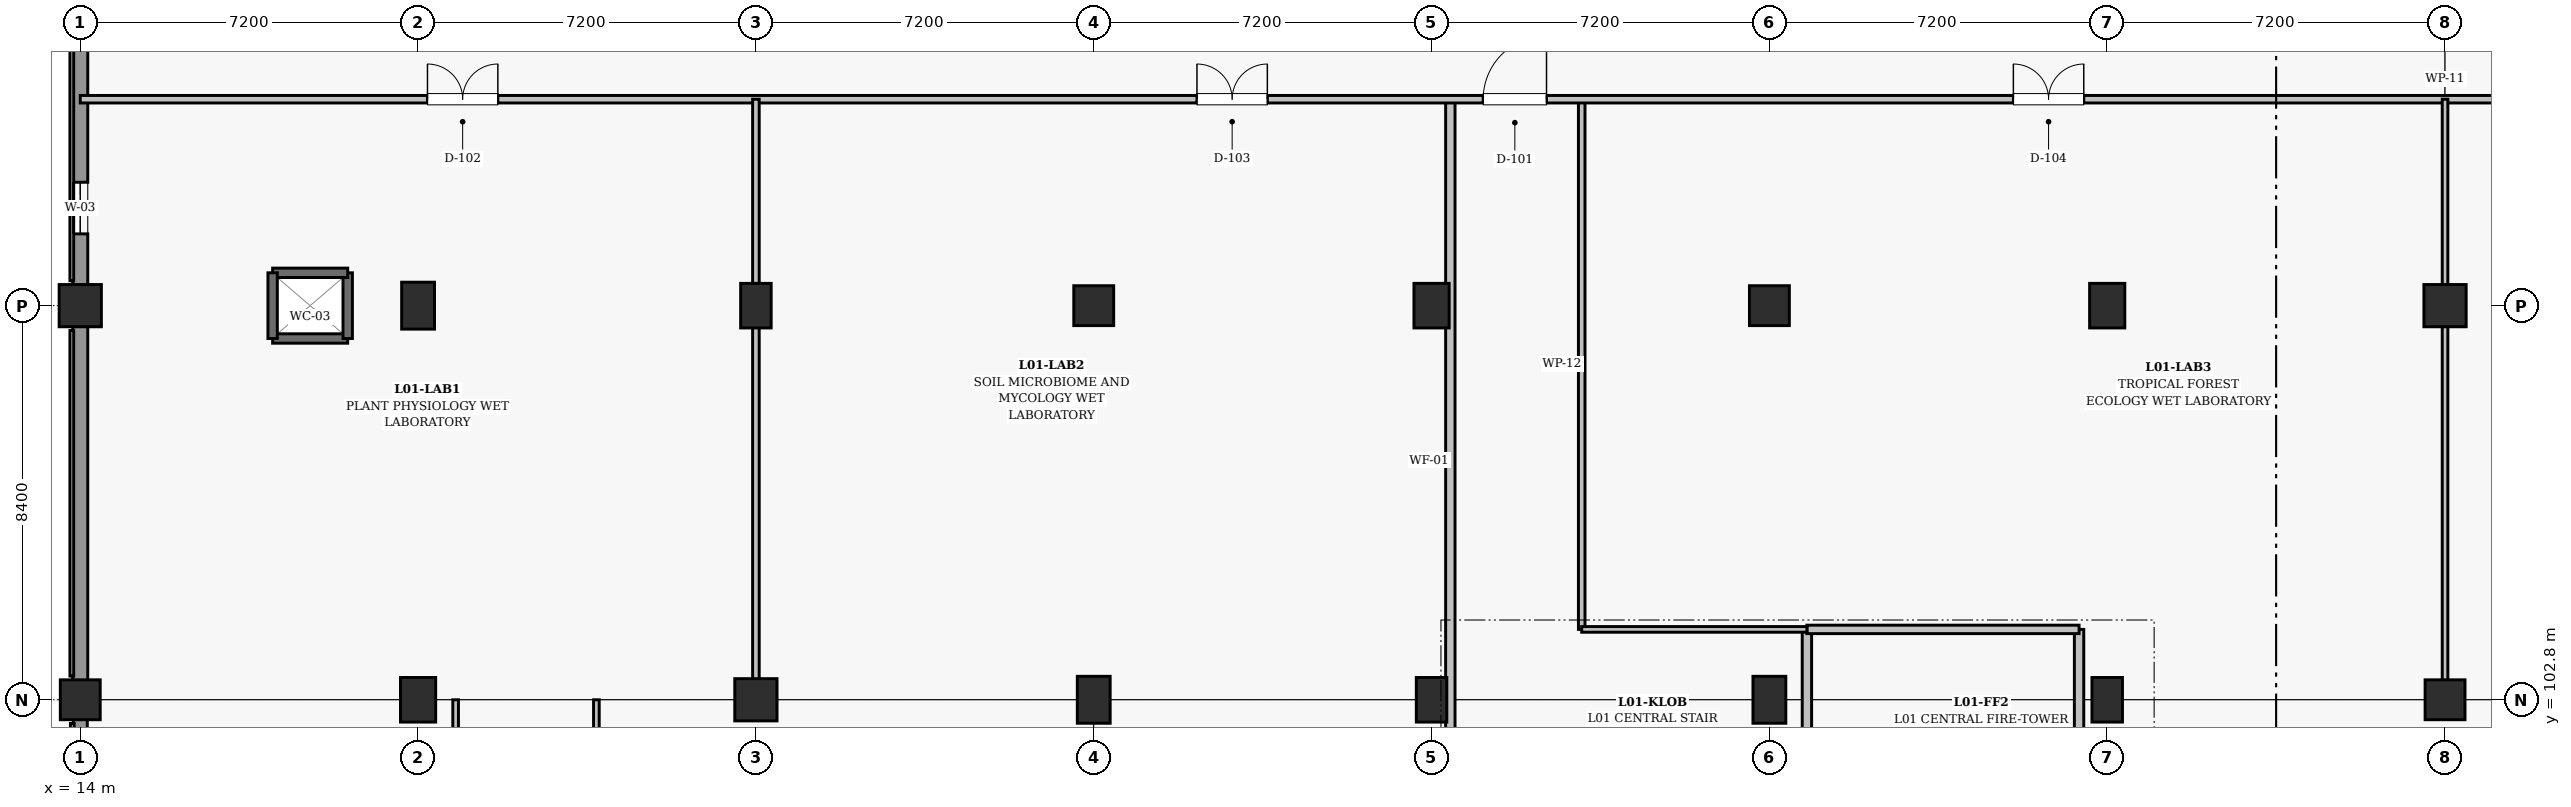
"""IFC4 building model, lengths in metres.
Left out: names, types, materials, properties, quantities, classifications, styles, units other than length and angle.
Written with IfcOpenShell. Run it as: python <this file> out.ifc"""

import sys

from ifc_helpers import new_model, si_unit, direction, frame, frame_2d, origin, origin_2d, place, context, subcontext, project, spatial, rectangle, extrude, element, fill, save


model = new_model("IFC4")
c1 = context("Model", 3, precision=1e-05, world=origin(), true_north=direction((0.0, 1.0)))
c2 = subcontext(c1, "Body", "Model", "MODEL_VIEW")
j1 = project(units=[si_unit("LENGTHUNIT", "METRE"), si_unit("PLANEANGLEUNIT", "RADIAN")], contexts=[c1])
p1 = place(None, origin())
s1 = spatial("IfcSite", under=j1, at=p1, CompositionType="ELEMENT")
p2 = place(p1, origin())
s2 = spatial("IfcBuilding", under=s1, at=p2, CompositionType="ELEMENT")
p3 = place(p2, frame((0.0, 0.0, 5.4)))
s3 = spatial("IfcBuildingStorey", under=s2, at=p3, CompositionType="ELEMENT", Elevation=5.4)
p4 = place(p3, frame((14.0, 102.8, 0.0), z_axis=(0.0, 0.0, 1.0), x_axis=(1.0, 0.0, 0.0)))
e1 = element("IfcColumn", 1, at=p4, inside=s3, PredefinedType="COLUMN", context=c2, shape_type="SweptSolid", body=[
    extrude(rectangle(XDim=0.85, YDim=0.85, at=origin_2d()), origin(), (0.0, 0.0, 1.0), 4.5),
])
p5 = place(p3, frame((14.0, 111.2, 0.0), z_axis=(0.0, 0.0, 1.0), x_axis=(1.0, 0.0, 0.0)))
e2 = element("IfcColumn", 2, at=p5, inside=s3, PredefinedType="COLUMN", context=c2, shape_type="SweptSolid", body=[
    extrude(rectangle(XDim=0.9, YDim=0.9, at=origin_2d()), origin(), (0.0, 0.0, 1.0), 4.5),
])
p6 = place(p3, frame((21.2, 102.8, 0.0), z_axis=(0.0, 0.0, 1.0), x_axis=(1.0, 0.0, 0.0)))
e3 = element("IfcColumn", 3, at=p6, inside=s3, PredefinedType="COLUMN", context=c2, shape_type="SweptSolid", body=[
    extrude(rectangle(XDim=0.75, YDim=0.95, at=origin_2d()), origin(), (0.0, 0.0, 1.0), 4.5),
])
p7 = place(p3, frame((21.2, 111.2, 0.0), z_axis=(0.0, 0.0, 1.0), x_axis=(1.0, 0.0, 0.0)))
e4 = element("IfcColumn", 4, at=p7, inside=s3, PredefinedType="COLUMN", context=c2, shape_type="SweptSolid", body=[
    extrude(rectangle(XDim=0.7, YDim=1.0, at=origin_2d()), origin(), (0.0, 0.0, 1.0), 4.5),
])
p8 = place(p3, frame((28.4, 102.8, 0.0), z_axis=(0.0, 0.0, 1.0), x_axis=(1.0, 0.0, 0.0)))
e5 = element("IfcColumn", 5, at=p8, inside=s3, PredefinedType="COLUMN", context=c2, shape_type="SweptSolid", body=[
    extrude(rectangle(XDim=0.9, YDim=0.9, at=origin_2d()), origin(), (0.0, 0.0, 1.0), 4.5),
])
p9 = place(p3, frame((28.4, 111.2, 0.0), z_axis=(0.0, 0.0, 1.0), x_axis=(1.0, 0.0, 0.0)))
e6 = element("IfcColumn", 6, at=p9, inside=s3, PredefinedType="COLUMN", context=c2, shape_type="SweptSolid", body=[
    extrude(rectangle(XDim=0.65, YDim=0.95, at=origin_2d()), origin(), (0.0, 0.0, 1.0), 4.5),
])
p10 = place(p3, frame((35.6, 102.8, 0.0), z_axis=(0.0, 0.0, 1.0), x_axis=(1.0, 0.0, 0.0)))
e7 = element("IfcColumn", 7, at=p10, inside=s3, PredefinedType="COLUMN", context=c2, shape_type="SweptSolid", body=[
    extrude(rectangle(XDim=0.7, YDim=1.0, at=origin_2d()), origin(), (0.0, 0.0, 1.0), 4.5),
])
p11 = place(p3, frame((35.6, 111.2, 0.0), z_axis=(0.0, 0.0, 1.0), x_axis=(1.0, 0.0, 0.0)))
e8 = element("IfcColumn", 8, at=p11, inside=s3, PredefinedType="COLUMN", context=c2, shape_type="SweptSolid", body=[
    extrude(rectangle(XDim=0.85, YDim=0.85, at=origin_2d()), origin(), (0.0, 0.0, 1.0), 4.5),
])
p12 = place(p3, frame((42.8, 102.8, 0.0), z_axis=(0.0, 0.0, 1.0), x_axis=(1.0, 0.0, 0.0)))
e9 = element("IfcColumn", 9, at=p12, inside=s3, PredefinedType="COLUMN", context=c2, shape_type="SweptSolid", body=[
    extrude(rectangle(XDim=0.65, YDim=0.95, at=origin_2d()), origin(), (0.0, 0.0, 1.0), 4.5),
])
p13 = place(p3, frame((42.8, 111.2, 0.0), z_axis=(0.0, 0.0, 1.0), x_axis=(1.0, 0.0, 0.0)))
e10 = element("IfcColumn", 10, at=p13, inside=s3, PredefinedType="COLUMN", context=c2, shape_type="SweptSolid", body=[
    extrude(rectangle(XDim=0.75, YDim=0.95, at=origin_2d()), origin(), (0.0, 0.0, 1.0), 4.5),
])
p14 = place(p3, frame((50.0, 102.8, 0.0), z_axis=(0.0, 0.0, 1.0), x_axis=(1.0, 0.0, 0.0)))
e11 = element("IfcColumn", 11, at=p14, inside=s3, PredefinedType="COLUMN", context=c2, shape_type="SweptSolid", body=[
    extrude(rectangle(XDim=0.7, YDim=1.0, at=origin_2d()), origin(), (0.0, 0.0, 1.0), 4.5),
])
p15 = place(p3, frame((50.0, 111.2, 0.0), z_axis=(0.0, 0.0, 1.0), x_axis=(1.0, 0.0, 0.0)))
e12 = element("IfcColumn", 12, at=p15, inside=s3, PredefinedType="COLUMN", context=c2, shape_type="SweptSolid", body=[
    extrude(rectangle(XDim=0.85, YDim=0.85, at=origin_2d()), origin(), (0.0, 0.0, 1.0), 4.5),
])
p16 = place(p3, frame((57.2, 102.8, 0.0), z_axis=(0.0, 0.0, 1.0), x_axis=(1.0, 0.0, 0.0)))
e13 = element("IfcColumn", 13, at=p16, inside=s3, PredefinedType="COLUMN", context=c2, shape_type="SweptSolid", body=[
    extrude(rectangle(XDim=0.65, YDim=0.95, at=origin_2d()), origin(), (0.0, 0.0, 1.0), 4.5),
])
p17 = place(p3, frame((57.2, 111.2, 0.0), z_axis=(0.0, 0.0, 1.0), x_axis=(1.0, 0.0, 0.0)))
e14 = element("IfcColumn", 14, at=p17, inside=s3, PredefinedType="COLUMN", context=c2, shape_type="SweptSolid", body=[
    extrude(rectangle(XDim=0.75, YDim=0.95, at=origin_2d()), origin(), (0.0, 0.0, 1.0), 4.5),
])
p18 = place(p3, frame((64.4, 102.8, 0.0), z_axis=(0.0, 0.0, 1.0), x_axis=(1.0, 0.0, 0.0)))
e15 = element("IfcColumn", 15, at=p18, inside=s3, PredefinedType="COLUMN", context=c2, shape_type="SweptSolid", body=[
    extrude(rectangle(XDim=0.85, YDim=0.85, at=origin_2d()), origin(), (0.0, 0.0, 1.0), 4.5),
])
p19 = place(p3, frame((64.4, 111.2, 0.0), z_axis=(0.0, 0.0, 1.0), x_axis=(1.0, 0.0, 0.0)))
e16 = element("IfcColumn", 16, at=p19, inside=s3, PredefinedType="COLUMN", context=c2, shape_type="SweptSolid", body=[
    extrude(rectangle(XDim=0.9, YDim=0.9, at=origin_2d()), origin(), (0.0, 0.0, 1.0), 4.5),
])
p20 = place(p3, frame((14.0, 103.205, 0.0), z_axis=(0.0, 0.0, 1.0), x_axis=(0.0, 1.0, 0.0)))
e17 = element("IfcWall", 17, at=p20, inside=s3, PredefinedType="SOLIDWALL", context=c2, shape_type="SweptSolid", body=[
    extrude(rectangle(XDim=7.565, YDim=0.32, at=frame_2d((3.782, 0.0))), origin(), (0.0, 0.0, 1.0), 3.555),
])
p21 = place(p3, frame((14.0, 111.63, 0.0), z_axis=(0.0, 0.0, 1.0), x_axis=(0.0, 1.0, 0.0)))
e18 = element("IfcWall", 18, at=p21, inside=s3, PredefinedType="SOLIDWALL", context=c2, shape_type="SweptSolid", body=[
    extrude(rectangle(XDim=7.515, YDim=0.32, at=frame_2d((3.758, 0.0))), origin(), (0.0, 0.0, 1.0), 3.555),
])
p22 = place(p21, frame((1.1, 0.0, 0.95)))
e19 = element("IfcOpeningElement", 19, at=p22, cuts=e18, PredefinedType="OPENING", context=c2, shape_type="SweptSolid", body=[
    extrude(rectangle(XDim=1.1, YDim=2.3, at=frame_2d((0.55, 1.15))), frame((0.0, 0.17, 0.0), z_axis=(0.0, -1.0, 0.0), x_axis=(1.0, 0.0, 0.0)), (0.0, 0.0, 1.0), 0.34),
])
p23 = place(p3, frame((14.0, 94.78, 0.0), z_axis=(0.0, 0.0, 1.0), x_axis=(0.0, 1.0, 0.0)))
e20 = element("IfcWall", 20, at=p23, inside=s3, PredefinedType="SOLIDWALL", context=c2, shape_type="SweptSolid", body=[
    extrude(rectangle(XDim=7.615, YDim=0.3, at=frame_2d((3.808, 0.0))), origin(), (0.0, 0.0, 1.0), 3.575),
])
p24 = place(p3, frame((18.1, 110.5, 0.0), z_axis=(0.0, 0.0, 1.0), x_axis=(1.0, 0.0, 0.0)))
e21 = element("IfcWall", 21, at=p24, inside=s3, PredefinedType="SHEAR", context=c2, shape_type="SweptSolid", body=[
    extrude(rectangle(XDim=1.6, YDim=0.2, at=frame_2d((0.8, 0.0))), origin(), (0.0, 0.0, 1.0), 4.14),
])
p25 = place(p3, frame((19.7, 110.5, 0.0), z_axis=(0.0, 0.0, 1.0), x_axis=(0.0, 1.0, 0.0)))
e22 = element("IfcWall", 22, at=p25, inside=s3, PredefinedType="SHEAR", context=c2, shape_type="SweptSolid", body=[
    extrude(rectangle(XDim=1.4, YDim=0.2, at=frame_2d((0.7, 0.0))), origin(), (0.0, 0.0, 1.0), 4.14),
])
p26 = place(p3, frame((19.7, 111.9, 0.0), z_axis=(0.0, 0.0, 1.0), x_axis=(-1.0, 0.0, 0.0)))
e23 = element("IfcWall", 23, at=p26, inside=s3, PredefinedType="SHEAR", context=c2, shape_type="SweptSolid", body=[
    extrude(rectangle(XDim=1.6, YDim=0.2, at=frame_2d((0.8, 0.0))), origin(), (0.0, 0.0, 1.0), 4.14),
])
p27 = place(p3, frame((18.1, 111.9, 0.0), z_axis=(0.0, 0.0, 1.0), x_axis=(0.0, -1.0, 0.0)))
e24 = element("IfcWall", 24, at=p27, inside=s3, PredefinedType="SHEAR", context=c2, shape_type="SweptSolid", body=[
    extrude(rectangle(XDim=1.4, YDim=0.2, at=frame_2d((0.7, 0.0))), origin(), (0.0, 0.0, 1.0), 4.14),
])
p28 = place(p3, frame((50.8, 99.1, 0.0), z_axis=(0.0, 0.0, 1.0), x_axis=(0.0, 1.0, 0.0)))
e25 = element("IfcWall", 25, at=p28, inside=s3, PredefinedType="SOLIDWALL", context=c2, shape_type="SweptSolid", body=[
    extrude(rectangle(XDim=5.2, YDim=0.2, at=frame_2d((2.6, 0.0))), origin(), (0.0, 0.0, 1.0), 3.36),
])
p29 = place(p28, frame((1.55, 0.0, 0.0)))
e26 = element("IfcOpeningElement", 26, at=p29, cuts=e25, PredefinedType="OPENING", context=c2, shape_type="SweptSolid", body=[
    extrude(rectangle(XDim=1.1, YDim=2.15, at=frame_2d((0.55, 1.075))), frame((0.0, 0.11, 0.0), z_axis=(0.0, -1.0, 0.0), x_axis=(1.0, 0.0, 0.0)), (0.0, 0.0, 1.0), 0.22),
])
p30 = place(p3, frame((56.6, 99.1, 0.0), z_axis=(0.0, 0.0, 1.0), x_axis=(0.0, 1.0, 0.0)))
e27 = element("IfcWall", 27, at=p30, inside=s3, PredefinedType="SOLIDWALL", context=c2, shape_type="SweptSolid", body=[
    extrude(rectangle(XDim=5.2, YDim=0.2, at=frame_2d((2.6, 0.0))), origin(), (0.0, 0.0, 1.0), 3.36),
])
p31 = place(p3, frame((50.8, 104.3, 0.0), z_axis=(0.0, 0.0, 1.0), x_axis=(1.0, 0.0, 0.0)))
e28 = element("IfcWall", 28, at=p31, inside=s3, PredefinedType="SOLIDWALL", context=c2, shape_type="SweptSolid", body=[
    extrude(rectangle(XDim=5.8, YDim=0.18, at=frame_2d((2.9, 0.0))), origin(), (0.0, 0.0, 1.0), 3.56),
])
p32 = place(p3, frame((43.2, 100.2, 0.0), z_axis=(0.0, 0.0, 1.0), x_axis=(0.0, 1.0, 0.0)))
e29 = element("IfcWall", 29, at=p32, inside=s3, PredefinedType="SOLIDWALL", context=c2, shape_type="SweptSolid", body=[
    extrude(rectangle(XDim=15.4, YDim=0.2, at=frame_2d((7.7, 0.0))), origin(), (0.0, 0.0, 1.0), 2.96),
])
p33 = place(p32, frame((0.45, 0.0, 0.0)))
e30 = element("IfcOpeningElement", 30, at=p33, cuts=e29, PredefinedType="OPENING", context=c2, shape_type="SweptSolid", body=[
    extrude(rectangle(XDim=1.1, YDim=2.15, at=frame_2d((0.55, 1.075))), frame((0.0, 0.11, 0.0), z_axis=(0.0, -1.0, 0.0), x_axis=(1.0, 0.0, 0.0)), (0.0, 0.0, 1.0), 0.22),
])
p34 = place(p3, frame((46.0, 104.3, 0.0), z_axis=(0.0, 0.0, 1.0), x_axis=(0.0, 1.0, 0.0)))
e31 = element("IfcWall", 31, at=p34, inside=s3, PredefinedType="PARTITIONING", context=c2, shape_type="SweptSolid", body=[
    extrude(rectangle(XDim=11.3, YDim=0.14, at=frame_2d((5.65, 0.0))), origin(), (0.0, 0.0, 1.0), 3.52),
])
p35 = place(p3, frame((46.0, 104.3, 0.0), z_axis=(0.0, 0.0, 1.0), x_axis=(1.0, 0.0, 0.0)))
e32 = element("IfcWall", 32, at=p35, inside=s3, PredefinedType="PARTITIONING", context=c2, shape_type="SweptSolid", body=[
    extrude(rectangle(XDim=4.8, YDim=0.12, at=frame_2d((2.4, 0.0))), origin(), (0.0, 0.0, 1.0), 3.31),
])
p36 = place(p3, frame((14.0, 115.6, 0.0), z_axis=(0.0, 0.0, 1.0), x_axis=(1.0, 0.0, 0.0)))
e33 = element("IfcWall", 33, at=p36, inside=s3, PredefinedType="PARTITIONING", context=c2, shape_type="SweptSolid", body=[
    extrude(rectangle(XDim=100.8, YDim=0.16, at=frame_2d((50.4, 0.0))), origin(), (0.0, 0.0, 1.0), 2.96),
])
p37 = place(p36, frame((29.9, 0.0, 0.0)))
e34 = element("IfcOpeningElement", 34, at=p37, cuts=e33, PredefinedType="OPENING", context=c2, shape_type="SweptSolid", body=[
    extrude(rectangle(XDim=1.35, YDim=2.2, at=frame_2d((0.675, 1.1))), frame((0.0, 0.09, 0.0), z_axis=(0.0, -1.0, 0.0), x_axis=(1.0, 0.0, 0.0)), (0.0, 0.0, 1.0), 0.18),
])
p38 = place(p36, frame((7.4, 0.0, 0.0)))
e35 = element("IfcOpeningElement", 35, at=p38, cuts=e33, PredefinedType="OPENING", context=c2, shape_type="SweptSolid", body=[
    extrude(rectangle(XDim=1.5, YDim=2.25, at=frame_2d((0.75, 1.125))), frame((0.0, 0.09, 0.0), z_axis=(0.0, -1.0, 0.0), x_axis=(1.0, 0.0, 0.0)), (0.0, 0.0, 1.0), 0.18),
])
p39 = place(p36, frame((23.8, 0.0, 0.0)))
e36 = element("IfcOpeningElement", 36, at=p39, cuts=e33, PredefinedType="OPENING", context=c2, shape_type="SweptSolid", body=[
    extrude(rectangle(XDim=1.5, YDim=2.25, at=frame_2d((0.75, 1.125))), frame((0.0, 0.09, 0.0), z_axis=(0.0, -1.0, 0.0), x_axis=(1.0, 0.0, 0.0)), (0.0, 0.0, 1.0), 0.18),
])
p40 = place(p36, frame((41.2, 0.0, 0.0)))
e37 = element("IfcOpeningElement", 37, at=p40, cuts=e33, PredefinedType="OPENING", context=c2, shape_type="SweptSolid", body=[
    extrude(rectangle(XDim=1.5, YDim=2.25, at=frame_2d((0.75, 1.125))), frame((0.0, 0.09, 0.0), z_axis=(0.0, -1.0, 0.0), x_axis=(1.0, 0.0, 0.0)), (0.0, 0.0, 1.0), 0.18),
])
p41 = place(p36, frame((59.4, 0.0, 0.0)))
e38 = element("IfcOpeningElement", 38, at=p41, cuts=e33, PredefinedType="OPENING", context=c2, shape_type="SweptSolid", body=[
    extrude(rectangle(XDim=1.5, YDim=2.25, at=frame_2d((0.75, 1.125))), frame((0.0, 0.09, 0.0), z_axis=(0.0, -1.0, 0.0), x_axis=(1.0, 0.0, 0.0)), (0.0, 0.0, 1.0), 0.18),
])
p42 = place(p36, frame((77.4, 0.0, 0.0)))
e39 = element("IfcOpeningElement", 39, at=p42, cuts=e33, PredefinedType="OPENING", context=c2, shape_type="SweptSolid", body=[
    extrude(rectangle(XDim=1.5, YDim=2.25, at=frame_2d((0.75, 1.125))), frame((0.0, 0.09, 0.0), z_axis=(0.0, -1.0, 0.0), x_axis=(1.0, 0.0, 0.0)), (0.0, 0.0, 1.0), 0.18),
])
p43 = place(p36, frame((95.4, 0.0, 0.0)))
e40 = element("IfcOpeningElement", 40, at=p43, cuts=e33, PredefinedType="OPENING", context=c2, shape_type="SweptSolid", body=[
    extrude(rectangle(XDim=1.45, YDim=2.2, at=frame_2d((0.725, 1.1))), frame((0.0, 0.09, 0.0), z_axis=(0.0, -1.0, 0.0), x_axis=(1.0, 0.0, 0.0)), (0.0, 0.0, 1.0), 0.18),
])
p44 = place(p3, frame((28.4, 102.8, 0.0), z_axis=(0.0, 0.0, 1.0), x_axis=(0.0, 1.0, 0.0)))
e41 = element("IfcWall", 41, at=p44, inside=s3, PredefinedType="PARTITIONING", context=c2, shape_type="SweptSolid", body=[
    extrude(rectangle(XDim=12.8, YDim=0.14, at=frame_2d((6.4, 0.0))), origin(), (0.0, 0.0, 1.0), 3.36),
])
p45 = place(p3, frame((64.4, 102.8, 0.0), z_axis=(0.0, 0.0, 1.0), x_axis=(0.0, 1.0, 0.0)))
e42 = element("IfcWall", 42, at=p45, inside=s3, PredefinedType="PARTITIONING", context=c2, shape_type="SweptSolid", body=[
    extrude(rectangle(XDim=12.8, YDim=0.12, at=frame_2d((6.4, 0.0))), origin(), (0.0, 0.0, 1.0), 3.36),
])
p46 = place(p3, frame((25.0, 14.0, 0.0), z_axis=(0.0, 0.0, 1.0), x_axis=(0.0, 1.0, 0.0)))
e43 = element("IfcWall", 43, at=p46, inside=s3, PredefinedType="PARTITIONING", context=c2, shape_type="SweptSolid", body=[
    extrude(rectangle(XDim=88.8, YDim=0.12, at=frame_2d((44.4, 0.0))), origin(), (0.0, 0.0, 1.0), 3.38),
])
p47 = place(p46, frame((7.4, 0.0, 0.0)))
e44 = element("IfcOpeningElement", 44, at=p47, cuts=e43, PredefinedType="OPENING", context=c2, shape_type="SweptSolid", body=[
    extrude(rectangle(XDim=1.35, YDim=2.2, at=frame_2d((0.675, 1.1))), frame((0.0, 0.07, 0.0), z_axis=(0.0, -1.0, 0.0), x_axis=(1.0, 0.0, 0.0)), (0.0, 0.0, 1.0), 0.14),
])
p48 = place(p46, frame((24.5, 0.0, 0.0)))
e45 = element("IfcOpeningElement", 45, at=p48, cuts=e43, PredefinedType="OPENING", context=c2, shape_type="SweptSolid", body=[
    extrude(rectangle(XDim=1.0, YDim=2.15, at=frame_2d((0.5, 1.075))), frame((0.0, 0.07, 0.0), z_axis=(0.0, -1.0, 0.0), x_axis=(1.0, 0.0, 0.0)), (0.0, 0.0, 1.0), 0.14),
])
p49 = place(p46, frame((38.7, 0.0, 0.0)))
e46 = element("IfcOpeningElement", 46, at=p49, cuts=e43, PredefinedType="OPENING", context=c2, shape_type="SweptSolid", body=[
    extrude(rectangle(XDim=1.1, YDim=2.15, at=frame_2d((0.55, 1.075))), frame((0.0, 0.07, 0.0), z_axis=(0.0, -1.0, 0.0), x_axis=(1.0, 0.0, 0.0)), (0.0, 0.0, 1.0), 0.14),
])
p50 = place(p46, frame((55.8, 0.0, 0.0)))
e47 = element("IfcOpeningElement", 47, at=p50, cuts=e43, PredefinedType="OPENING", context=c2, shape_type="SweptSolid", body=[
    extrude(rectangle(XDim=1.18, YDim=2.2, at=frame_2d((0.59, 1.1))), frame((0.0, 0.07, 0.0), z_axis=(0.0, -1.0, 0.0), x_axis=(1.0, 0.0, 0.0)), (0.0, 0.0, 1.0), 0.14),
])
p51 = place(p46, frame((76.6, 0.0, 0.0)))
e48 = element("IfcOpeningElement", 48, at=p51, cuts=e43, PredefinedType="OPENING", context=c2, shape_type="SweptSolid", body=[
    extrude(rectangle(XDim=1.25, YDim=2.2, at=frame_2d((0.625, 1.1))), frame((0.0, 0.07, 0.0), z_axis=(0.0, -1.0, 0.0), x_axis=(1.0, 0.0, 0.0)), (0.0, 0.0, 1.0), 0.14),
])
p52 = place(p3, frame((22.0, 63.2, 0.0), z_axis=(0.0, 0.0, 1.0), x_axis=(0.0, 1.0, 0.0)))
e49 = element("IfcWall", 49, at=p52, inside=s3, PredefinedType="PARTITIONING", context=c2, shape_type="SweptSolid", body=[
    extrude(rectangle(XDim=39.6, YDim=0.12, at=frame_2d((19.8, 0.0))), origin(), (0.0, 0.0, 1.0), 3.38),
])
p53 = place(p52, frame((11.3, 0.0, 0.0)))
e50 = element("IfcOpeningElement", 50, at=p53, cuts=e49, PredefinedType="OPENING", context=c2, shape_type="SweptSolid", body=[
    extrude(rectangle(XDim=1.0, YDim=2.15, at=frame_2d((0.5, 1.075))), frame((0.0, 0.07, 0.0), z_axis=(0.0, -1.0, 0.0), x_axis=(1.0, 0.0, 0.0)), (0.0, 0.0, 1.0), 0.14),
])
p54 = place(p52, frame((26.3, 0.0, 0.0)))
e51 = element("IfcOpeningElement", 51, at=p54, cuts=e49, PredefinedType="OPENING", context=c2, shape_type="SweptSolid", body=[
    extrude(rectangle(XDim=1.1, YDim=2.15, at=frame_2d((0.55, 1.075))), frame((0.0, 0.07, 0.0), z_axis=(0.0, -1.0, 0.0), x_axis=(1.0, 0.0, 0.0)), (0.0, 0.0, 1.0), 0.14),
])
p55 = place(p22, origin())
e52 = element("IfcWindow", 52, at=p55, inside=s3, PartitioningType="SINGLE_PANEL", PredefinedType="WINDOW", context=c2, shape_type="SweptSolid", body=[
    extrude(rectangle(XDim=1.1, YDim=2.3, at=frame_2d((0.55, 1.15))), frame((0.0, 0.03, 0.0), z_axis=(0.0, -1.0, 0.0), x_axis=(1.0, 0.0, 0.0)), (0.0, 0.0, 1.0), 0.06),
])
fill(e19, e52)
p56 = place(p37, origin())
e53 = element("IfcDoor", 53, at=p56, inside=s3, OperationType="SINGLE_SWING_RIGHT", PredefinedType="DOOR", context=c2, shape_type="SweptSolid", body=[
    extrude(rectangle(XDim=1.35, YDim=2.2, at=frame_2d((0.675, 1.1))), frame((0.0, 0.025, 0.0), z_axis=(0.0, -1.0, 0.0), x_axis=(1.0, 0.0, 0.0)), (0.0, 0.0, 1.0), 0.05),
])
fill(e34, e53)
p57 = place(p38, origin())
e54 = element("IfcDoor", 54, at=p57, inside=s3, OperationType="DOUBLE_DOOR_SINGLE_SWING", PredefinedType="DOOR", context=c2, shape_type="SweptSolid", body=[
    extrude(rectangle(XDim=1.5, YDim=2.25, at=frame_2d((0.75, 1.125))), frame((0.0, 0.025, 0.0), z_axis=(0.0, -1.0, 0.0), x_axis=(1.0, 0.0, 0.0)), (0.0, 0.0, 1.0), 0.05),
])
fill(e35, e54)
p58 = place(p39, origin())
e55 = element("IfcDoor", 55, at=p58, inside=s3, OperationType="DOUBLE_DOOR_SINGLE_SWING", PredefinedType="DOOR", context=c2, shape_type="SweptSolid", body=[
    extrude(rectangle(XDim=1.5, YDim=2.25, at=frame_2d((0.75, 1.125))), frame((0.0, 0.025, 0.0), z_axis=(0.0, -1.0, 0.0), x_axis=(1.0, 0.0, 0.0)), (0.0, 0.0, 1.0), 0.05),
])
fill(e36, e55)
p59 = place(p40, origin())
e56 = element("IfcDoor", 56, at=p59, inside=s3, OperationType="DOUBLE_DOOR_SINGLE_SWING", PredefinedType="DOOR", context=c2, shape_type="SweptSolid", body=[
    extrude(rectangle(XDim=1.5, YDim=2.25, at=frame_2d((0.75, 1.125))), frame((0.0, 0.025, 0.0), z_axis=(0.0, -1.0, 0.0), x_axis=(1.0, 0.0, 0.0)), (0.0, 0.0, 1.0), 0.05),
])
fill(e37, e56)
save(model, sys.argv[1])
